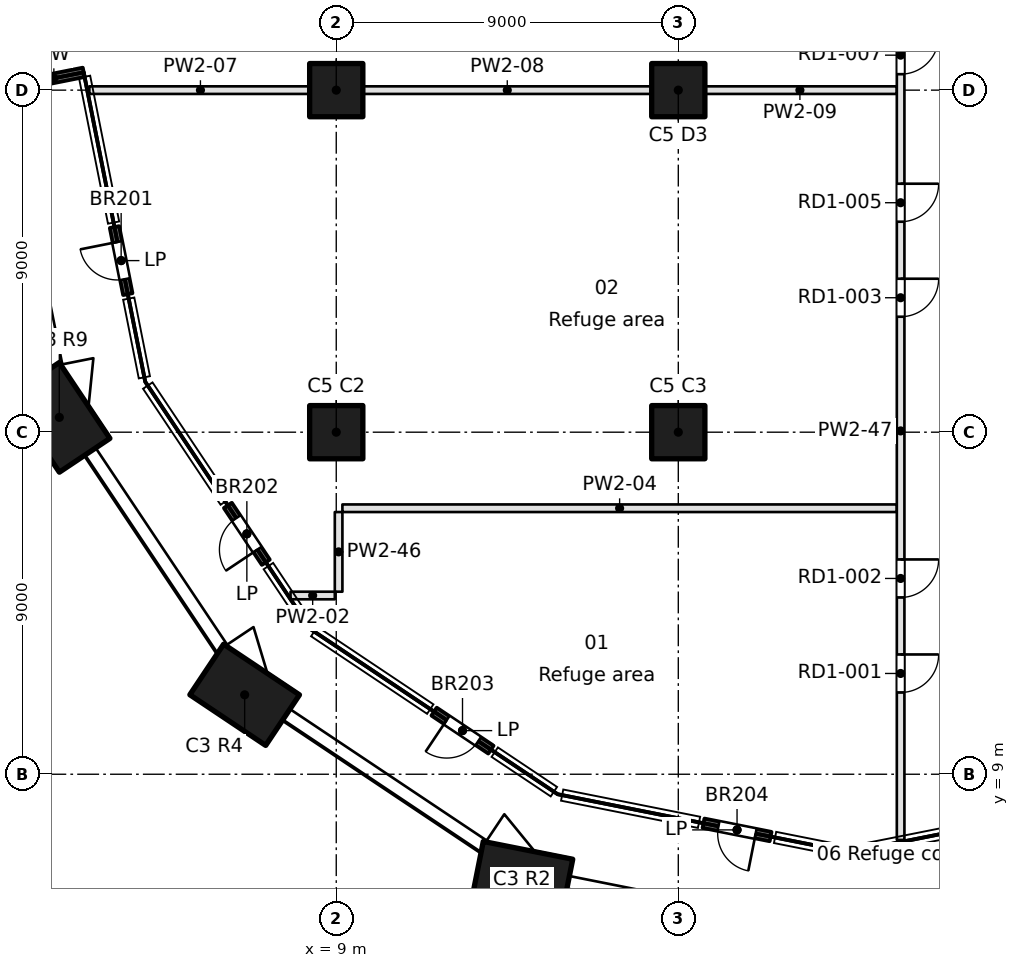
"""IFC4 building model, lengths in metres.
Left out: names, types, materials, properties, quantities, classifications, styles, units other than length and angle.
Written with IfcOpenShell. Run it as: python <this file> out.ifc"""

import sys

from ifc_helpers import new_model, si_unit, direction, frame, frame_2d, origin, origin_2d, place, context, subcontext, project, spatial, rectangle, extrude, element, fill, save


model = new_model("IFC4")
c1 = context("Model", 3, precision=1e-05, world=origin(), true_north=direction((0.0, 1.0)))
c2 = subcontext(c1, "Body", "Model", "MODEL_VIEW")
j1 = project(units=[si_unit("LENGTHUNIT", "METRE"), si_unit("PLANEANGLEUNIT", "RADIAN")], contexts=[c1])
p1 = place(None, origin())
s1 = spatial("IfcSite", under=j1, at=p1, CompositionType="ELEMENT")
p2 = place(p1, origin())
s2 = spatial("IfcBuilding", under=s1, at=p2, CompositionType="ELEMENT")
p3 = place(p2, frame((0.0, 0.0, 80.2)))
s3 = spatial("IfcBuildingStorey", under=s2, at=p3, CompositionType="ELEMENT", Elevation=80.2)
for number, where, z_axis, x_axis in (
    (1, (13.89, 6.213, 0.0), (0.0, 0.0, 1.0), (-0.981, 0.195, 0.0)),
    (2, (6.59, 11.09, 0.0), (0.0, 0.0, 1.0), (-0.831, 0.556, 0.0)),
    (3, (1.713, 18.39, 0.0), (0.0, 0.0, 1.0), (-0.556, 0.831, 0.0)),
):
    element("IfcColumn", number, at=place(p3, frame(where, z_axis=z_axis, x_axis=x_axis)), inside=s3, PredefinedType="COLUMN", context=c2, shape_type="SweptSolid", body=[
        extrude(rectangle(XDim=2.4, YDim=1.6, at=origin_2d()), origin(), (0.0, 0.0, 1.0), 4.6),
    ])
for number, where, z_axis, x_axis in (
    (4, (9.0, 18.0, 0.0), (0.0, 0.0, 1.0), (1.0, 0.0, 0.0)),
    (5, (9.0, 27.0, 0.0), (0.0, 0.0, 1.0), (1.0, 0.0, 0.0)),
    (6, (18.0, 18.0, 0.0), (0.0, 0.0, 1.0), (1.0, 0.0, 0.0)),
    (7, (18.0, 27.0, 0.0), (0.0, 0.0, 1.0), (1.0, 0.0, 0.0)),
):
    element("IfcColumn", number, at=place(p3, frame(where, z_axis=z_axis, x_axis=x_axis)), inside=s3, PredefinedType="COLUMN", context=c2, shape_type="SweptSolid", body=[
        extrude(rectangle(XDim=1.4, YDim=1.4, at=origin_2d()), origin(), (0.0, 0.0, 1.0), 4.6),
    ])
p4 = place(p3, frame((0.784, 27.157, 0.0), z_axis=(0.0, 0.0, 1.0), x_axis=(0.980826234823, 0.19488431718, 0.0)))
e8 = element("IfcWall", 8, at=p4, inside=s3, PredefinedType="SOLIDWALL", context=c2, shape_type="SweptSolid", body=[
    extrude(rectangle(XDim=1.601, YDim=0.25, at=frame_2d((0.801, 0.0))), origin(), (0.0, 0.0, 1.0), 4.2),
])
p5 = place(p3, frame((3.165, 23.397, 0.0), z_axis=(0.0, 0.0, 1.0), x_axis=(0.19517704197, -0.980768026746, 0.0)))
e9 = element("IfcWall", 9, at=p5, inside=s3, PredefinedType="SOLIDWALL", context=c2, shape_type="SweptSolid", body=[
    extrude(rectangle(XDim=1.8, YDim=0.25, at=frame_2d((0.9, 0.0))), origin(), (0.0, 0.0, 1.0), 4.2),
])
p6 = place(p5, frame((0.4, 0.0, 0.0)))
e10 = element("IfcOpeningElement", 10, at=p6, cuts=e9, PredefinedType="OPENING", context=c2, shape_type="SweptSolid", body=[
    extrude(rectangle(XDim=1.0, YDim=2.1, at=frame_2d((0.5, 1.05))), frame((0.0, 0.125, 0.0), z_axis=(0.0, -1.0, 0.0), x_axis=(1.0, 0.0, 0.0)), (0.0, 0.0, 1.0), 0.25),
])
p7 = place(p3, frame((6.148, 16.074, 0.0), z_axis=(0.0, 0.0, 1.0), x_axis=(0.555576323502, -0.83146554274, 0.0)))
e11 = element("IfcWall", 11, at=p7, inside=s3, PredefinedType="SOLIDWALL", context=c2, shape_type="SweptSolid", body=[
    extrude(rectangle(XDim=1.8, YDim=0.25, at=frame_2d((0.9, 0.0))), origin(), (0.0, 0.0, 1.0), 4.2),
])
p8 = place(p7, frame((0.4, 0.0, 0.0)))
e12 = element("IfcOpeningElement", 12, at=p8, cuts=e11, PredefinedType="OPENING", context=c2, shape_type="SweptSolid", body=[
    extrude(rectangle(XDim=1.0, YDim=2.1, at=frame_2d((0.5, 1.05))), frame((0.0, 0.125, 0.0), z_axis=(0.0, -1.0, 0.0), x_axis=(1.0, 0.0, 0.0)), (0.0, 0.0, 1.0), 0.25),
])
p9 = place(p3, frame((11.574, 10.648, 0.0), z_axis=(0.0, 0.0, 1.0), x_axis=(0.83146554274, -0.555576323502, 0.0)))
e13 = element("IfcWall", 13, at=p9, inside=s3, PredefinedType="SOLIDWALL", context=c2, shape_type="SweptSolid", body=[
    extrude(rectangle(XDim=1.8, YDim=0.25, at=frame_2d((0.9, 0.0))), origin(), (0.0, 0.0, 1.0), 4.2),
])
p10 = place(p9, frame((0.4, 0.0, 0.0)))
e14 = element("IfcOpeningElement", 14, at=p10, cuts=e13, PredefinedType="OPENING", context=c2, shape_type="SweptSolid", body=[
    extrude(rectangle(XDim=1.0, YDim=2.1, at=frame_2d((0.5, 1.05))), frame((0.0, 0.125, 0.0), z_axis=(0.0, -1.0, 0.0), x_axis=(1.0, 0.0, 0.0)), (0.0, 0.0, 1.0), 0.25),
])
p11 = place(p3, frame((18.663, 7.711, 0.0), z_axis=(0.0, 0.0, 1.0), x_axis=(0.980793982239, -0.195046569833, 0.0)))
e15 = element("IfcWall", 15, at=p11, inside=s3, PredefinedType="SOLIDWALL", context=c2, shape_type="SweptSolid", body=[
    extrude(rectangle(XDim=1.8, YDim=0.25, at=frame_2d((0.9, 0.0))), origin(), (0.0, 0.0, 1.0), 4.2),
])
p12 = place(p11, frame((0.4, 0.0, 0.0)))
e16 = element("IfcOpeningElement", 16, at=p12, cuts=e15, PredefinedType="OPENING", context=c2, shape_type="SweptSolid", body=[
    extrude(rectangle(XDim=1.0, YDim=2.1, at=frame_2d((0.5, 1.05))), frame((0.0, 0.125, 0.0), z_axis=(0.0, -1.0, 0.0), x_axis=(1.0, 0.0, 0.0)), (0.0, 0.0, 1.0), 0.25),
])
p13 = place(p3, frame((7.797, 13.703, 0.0), z_axis=(0.0, 0.0, 1.0), x_axis=(1.0, 0.0, 0.0)))
e17 = element("IfcWall", 17, at=p13, inside=s3, PredefinedType="PARTITIONING", context=c2, shape_type="SweptSolid", body=[
    extrude(rectangle(XDim=1.165, YDim=0.2, at=frame_2d((0.583, 0.0))), origin(), (0.0, 0.0, 1.0), 4.2),
])
p14 = place(p3, frame((9.162, 15.999, 0.0), z_axis=(0.0, 0.0, 1.0), x_axis=(1.0, 0.0, 0.0)))
e18 = element("IfcWall", 18, at=p14, inside=s3, PredefinedType="PARTITIONING", context=c2, shape_type="SweptSolid", body=[
    extrude(rectangle(XDim=14.588, YDim=0.2, at=frame_2d((7.294, 0.0))), origin(), (0.0, 0.0, 1.0), 4.2),
])
p15 = place(p3, frame((2.503, 27.0, 0.0), z_axis=(0.0, 0.0, 1.0), x_axis=(1.0, 0.0, 0.0)))
e19 = element("IfcWall", 19, at=p15, inside=s3, PredefinedType="PARTITIONING", context=c2, shape_type="SweptSolid", body=[
    extrude(rectangle(XDim=5.847, YDim=0.2, at=frame_2d((2.924, 0.0))), origin(), (0.0, 0.0, 1.0), 4.2),
])
p16 = place(p3, frame((9.65, 27.0, 0.0), z_axis=(0.0, 0.0, 1.0), x_axis=(1.0, 0.0, 0.0)))
e20 = element("IfcWall", 20, at=p16, inside=s3, PredefinedType="PARTITIONING", context=c2, shape_type="SweptSolid", body=[
    extrude(rectangle(XDim=7.7, YDim=0.2, at=frame_2d((3.85, 0.0))), origin(), (0.0, 0.0, 1.0), 4.2),
])
p17 = place(p3, frame((18.65, 27.0, 0.0), z_axis=(0.0, 0.0, 1.0), x_axis=(1.0, 0.0, 0.0)))
e21 = element("IfcWall", 21, at=p17, inside=s3, PredefinedType="PARTITIONING", context=c2, shape_type="SweptSolid", body=[
    extrude(rectangle(XDim=5.1, YDim=0.2, at=frame_2d((2.55, 0.0))), origin(), (0.0, 0.0, 1.0), 4.2),
])
p18 = place(p3, frame((9.062, 15.899, 0.0), z_axis=(0.0, 0.0, 1.0), x_axis=(0.0, -1.0, 0.0)))
e22 = element("IfcWall", 22, at=p18, inside=s3, PredefinedType="PARTITIONING", context=c2, shape_type="SweptSolid", body=[
    extrude(rectangle(XDim=2.096, YDim=0.2, at=frame_2d((1.048, 0.0))), origin(), (0.0, 0.0, 1.0), 4.2),
])
p19 = place(p3, frame((23.85, 7.272, 0.0), z_axis=(0.0, 0.0, 1.0), x_axis=(0.0, 1.0, 0.0)))
e23 = element("IfcWall", 23, at=p19, inside=s3, PredefinedType="PARTITIONING", context=c2, shape_type="SweptSolid", body=[
    extrude(rectangle(XDim=21.524, YDim=0.2, at=frame_2d((10.762, 0.0))), origin(), (0.0, 0.0, 1.0), 4.2),
])
p20 = place(p19, frame((3.88, 0.0, 0.0)))
e24 = element("IfcOpeningElement", 24, at=p20, cuts=e23, PredefinedType="OPENING", context=c2, shape_type="SweptSolid", body=[
    extrude(rectangle(XDim=1.0, YDim=2.1, at=frame_2d((0.5, 1.05))), frame((0.0, 0.1, 0.0), z_axis=(0.0, -1.0, 0.0), x_axis=(1.0, 0.0, 0.0)), (0.0, 0.0, 1.0), 0.2),
])
p21 = place(p19, frame((6.38, 0.0, 0.0)))
e25 = element("IfcOpeningElement", 25, at=p21, cuts=e23, PredefinedType="OPENING", context=c2, shape_type="SweptSolid", body=[
    extrude(rectangle(XDim=1.0, YDim=2.1, at=frame_2d((0.5, 1.05))), frame((0.0, 0.1, 0.0), z_axis=(0.0, -1.0, 0.0), x_axis=(1.0, 0.0, 0.0)), (0.0, 0.0, 1.0), 0.2),
])
p22 = place(p19, frame((13.766, 0.0, 0.0)))
e26 = element("IfcOpeningElement", 26, at=p22, cuts=e23, PredefinedType="OPENING", context=c2, shape_type="SweptSolid", body=[
    extrude(rectangle(XDim=1.0, YDim=2.1, at=frame_2d((0.5, 1.05))), frame((0.0, 0.1, 0.0), z_axis=(0.0, -1.0, 0.0), x_axis=(1.0, 0.0, 0.0)), (0.0, 0.0, 1.0), 0.2),
])
p23 = place(p19, frame((16.266, 0.0, 0.0)))
e27 = element("IfcOpeningElement", 27, at=p23, cuts=e23, PredefinedType="OPENING", context=c2, shape_type="SweptSolid", body=[
    extrude(rectangle(XDim=1.0, YDim=2.1, at=frame_2d((0.5, 1.05))), frame((0.0, 0.1, 0.0), z_axis=(0.0, -1.0, 0.0), x_axis=(1.0, 0.0, 0.0)), (0.0, 0.0, 1.0), 0.2),
])
p24 = place(p19, frame((20.148, 0.0, 0.0)))
e28 = element("IfcOpeningElement", 28, at=p24, cuts=e23, PredefinedType="OPENING", context=c2, shape_type="SweptSolid", body=[
    extrude(rectangle(XDim=1.0, YDim=2.1, at=frame_2d((0.5, 1.05))), frame((0.0, 0.1, 0.0), z_axis=(0.0, -1.0, 0.0), x_axis=(1.0, 0.0, 0.0)), (0.0, 0.0, 1.0), 0.2),
])
p25 = place(p6, frame((1.0, 0.0, 0.0), z_axis=(0.0, 0.0, 1.0), x_axis=(-1.0, 0.0, 0.0)))
e29 = element("IfcDoor", 29, at=p25, inside=s3, OperationType="SINGLE_SWING_RIGHT", PredefinedType="DOOR", context=c2, shape_type="SweptSolid", body=[
    extrude(rectangle(XDim=1.0, YDim=2.1, at=frame_2d((0.5, 1.05))), frame((0.0, 0.025, 0.0), z_axis=(0.0, -1.0, 0.0), x_axis=(1.0, 0.0, 0.0)), (0.0, 0.0, 1.0), 0.05),
])
fill(e10, e29)
p26 = place(p8, frame((1.0, 0.0, 0.0), z_axis=(0.0, 0.0, 1.0), x_axis=(-1.0, 0.0, 0.0)))
e30 = element("IfcDoor", 30, at=p26, inside=s3, OperationType="SINGLE_SWING_LEFT", PredefinedType="DOOR", context=c2, shape_type="SweptSolid", body=[
    extrude(rectangle(XDim=1.0, YDim=2.1, at=frame_2d((0.5, 1.05))), frame((0.0, 0.025, 0.0), z_axis=(0.0, -1.0, 0.0), x_axis=(1.0, 0.0, 0.0)), (0.0, 0.0, 1.0), 0.05),
])
fill(e12, e30)
p27 = place(p10, frame((1.0, 0.0, 0.0), z_axis=(0.0, 0.0, 1.0), x_axis=(-1.0, 0.0, 0.0)))
e31 = element("IfcDoor", 31, at=p27, inside=s3, OperationType="SINGLE_SWING_RIGHT", PredefinedType="DOOR", context=c2, shape_type="SweptSolid", body=[
    extrude(rectangle(XDim=1.0, YDim=2.1, at=frame_2d((0.5, 1.05))), frame((0.0, 0.025, 0.0), z_axis=(0.0, -1.0, 0.0), x_axis=(1.0, 0.0, 0.0)), (0.0, 0.0, 1.0), 0.05),
])
fill(e14, e31)
p28 = place(p12, frame((1.0, 0.0, 0.0), z_axis=(0.0, 0.0, 1.0), x_axis=(-1.0, 0.0, 0.0)))
e32 = element("IfcDoor", 32, at=p28, inside=s3, OperationType="SINGLE_SWING_LEFT", PredefinedType="DOOR", context=c2, shape_type="SweptSolid", body=[
    extrude(rectangle(XDim=1.0, YDim=2.1, at=frame_2d((0.5, 1.05))), frame((0.0, 0.025, 0.0), z_axis=(0.0, -1.0, 0.0), x_axis=(1.0, 0.0, 0.0)), (0.0, 0.0, 1.0), 0.05),
])
fill(e16, e32)
p29 = place(p20, frame((1.0, 0.0, 0.0), z_axis=(0.0, 0.0, 1.0), x_axis=(-1.0, 0.0, 0.0)))
e33 = element("IfcDoor", 33, at=p29, inside=s3, OperationType="SINGLE_SWING_LEFT", PredefinedType="DOOR", context=c2, shape_type="SweptSolid", body=[
    extrude(rectangle(XDim=1.0, YDim=2.1, at=frame_2d((0.5, 1.05))), frame((0.0, 0.025, 0.0), z_axis=(0.0, -1.0, 0.0), x_axis=(1.0, 0.0, 0.0)), (0.0, 0.0, 1.0), 0.05),
])
fill(e24, e33)
p30 = place(p21, frame((1.0, 0.0, 0.0), z_axis=(0.0, 0.0, 1.0), x_axis=(-1.0, 0.0, 0.0)))
e34 = element("IfcDoor", 34, at=p30, inside=s3, OperationType="SINGLE_SWING_LEFT", PredefinedType="DOOR", context=c2, shape_type="SweptSolid", body=[
    extrude(rectangle(XDim=1.0, YDim=2.1, at=frame_2d((0.5, 1.05))), frame((0.0, 0.025, 0.0), z_axis=(0.0, -1.0, 0.0), x_axis=(1.0, 0.0, 0.0)), (0.0, 0.0, 1.0), 0.05),
])
fill(e25, e34)
p31 = place(p22, frame((1.0, 0.0, 0.0), z_axis=(0.0, 0.0, 1.0), x_axis=(-1.0, 0.0, 0.0)))
e35 = element("IfcDoor", 35, at=p31, inside=s3, OperationType="SINGLE_SWING_LEFT", PredefinedType="DOOR", context=c2, shape_type="SweptSolid", body=[
    extrude(rectangle(XDim=1.0, YDim=2.1, at=frame_2d((0.5, 1.05))), frame((0.0, 0.025, 0.0), z_axis=(0.0, -1.0, 0.0), x_axis=(1.0, 0.0, 0.0)), (0.0, 0.0, 1.0), 0.05),
])
fill(e26, e35)
p32 = place(p23, frame((1.0, 0.0, 0.0), z_axis=(0.0, 0.0, 1.0), x_axis=(-1.0, 0.0, 0.0)))
e36 = element("IfcDoor", 36, at=p32, inside=s3, OperationType="SINGLE_SWING_LEFT", PredefinedType="DOOR", context=c2, shape_type="SweptSolid", body=[
    extrude(rectangle(XDim=1.0, YDim=2.1, at=frame_2d((0.5, 1.05))), frame((0.0, 0.025, 0.0), z_axis=(0.0, -1.0, 0.0), x_axis=(1.0, 0.0, 0.0)), (0.0, 0.0, 1.0), 0.05),
])
fill(e27, e36)
p33 = place(p24, frame((1.0, 0.0, 0.0), z_axis=(0.0, 0.0, 1.0), x_axis=(-1.0, 0.0, 0.0)))
e37 = element("IfcDoor", 37, at=p33, inside=s3, OperationType="SINGLE_SWING_LEFT", PredefinedType="DOOR", context=c2, shape_type="SweptSolid", body=[
    extrude(rectangle(XDim=1.0, YDim=2.1, at=frame_2d((0.5, 1.05))), frame((0.0, 0.025, 0.0), z_axis=(0.0, -1.0, 0.0), x_axis=(1.0, 0.0, 0.0)), (0.0, 0.0, 1.0), 0.05),
])
fill(e28, e37)
save(model, sys.argv[1])
